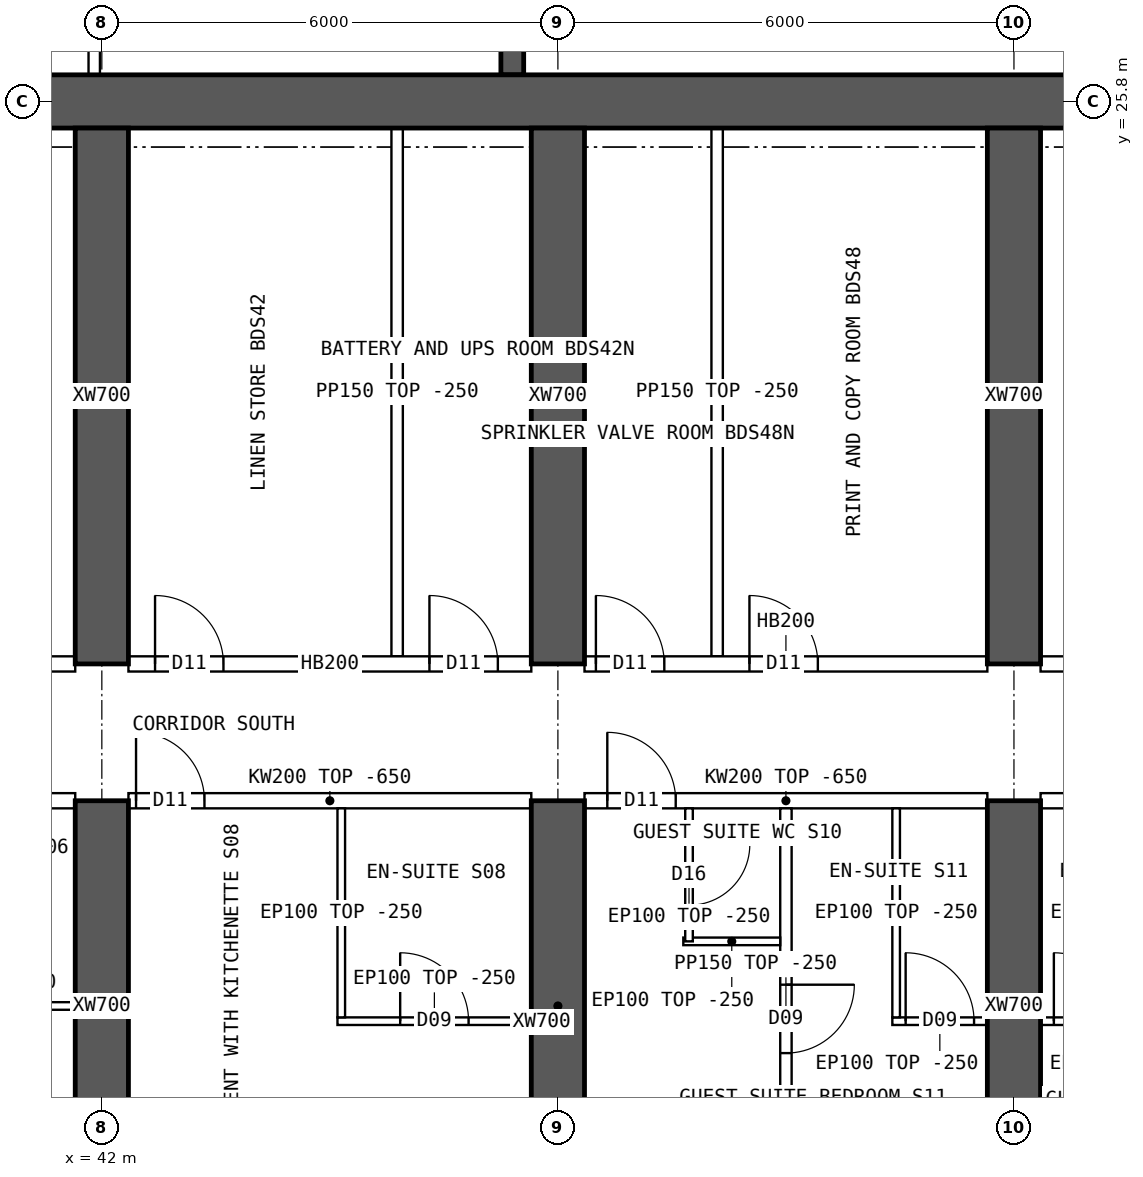
"""IFC4 building model, lengths in metres.
Left out: names, types, materials, properties, quantities, classifications, styles, units other than length and angle.
Written with IfcOpenShell. Run it as: python <this file> out.ifc"""

import sys

from ifc_helpers import new_model, si_unit, direction, frame, frame_2d, origin, place, context, subcontext, project, spatial, polyline, rectangle, outline, extrude, element, fill, save


model = new_model("IFC4")
c1 = context("Model", 3, precision=1e-05, world=origin(), true_north=direction((0.0, 1.0)))
c2 = subcontext(c1, "Body", "Model", "MODEL_VIEW")
j1 = project(units=[si_unit("LENGTHUNIT", "METRE"), si_unit("PLANEANGLEUNIT", "RADIAN")], contexts=[c1])
p1 = place(None, origin())
s1 = spatial("IfcSite", under=j1, at=p1, CompositionType="ELEMENT")
p2 = place(p1, origin())
s2 = spatial("IfcBuilding", under=s1, at=p2, CompositionType="ELEMENT")
p3 = place(p2, frame((0.0, 0.0, 235.3)))
s3 = spatial("IfcBuildingStorey", under=s2, at=p3, CompositionType="ELEMENT", Elevation=235.3)
p4 = place(p3, frame((18.0, 25.8, 0.0), z_axis=(0.0, 0.0, 1.0), x_axis=(1.0, 0.0, 0.0)))
e1 = element("IfcWall", 1, at=p4, inside=s3, PredefinedType="SHEAR", context=c2, shape_type="SweptSolid", body=[
    extrude(rectangle(XDim=48.0, YDim=0.7, at=frame_2d((24.0, 0.0))), origin(), (0.0, 0.0, 1.0), 3.75),
])
p5 = place(p3, frame((47.4, 26.15, 0.0), z_axis=(0.0, 0.0, 1.0), x_axis=(0.0, 1.0, 0.0)))
e2 = element("IfcWall", 2, at=p5, inside=s3, PredefinedType="SHEAR", context=c2, shape_type="SweptSolid", body=[
    extrude(rectangle(XDim=4.1, YDim=0.3, at=frame_2d((2.05, 0.0))), origin(), (0.0, 0.0, 1.0), 3.75),
])
p6 = place(p3, frame((42.0, 11.2, 0.0), z_axis=(0.0, 0.0, 1.0), x_axis=(0.0, 1.0, 0.0)))
e3 = element("IfcWall", 3, at=p6, inside=s3, PredefinedType="SHEAR", context=c2, shape_type="SweptSolid", body=[
    extrude(rectangle(XDim=5.4, YDim=0.7, at=frame_2d((2.7, 0.0))), origin(), (0.0, 0.0, 1.0), 3.75),
])
p7 = place(p3, frame((42.0, 18.4, 0.0), z_axis=(0.0, 0.0, 1.0), x_axis=(0.0, 1.0, 0.0)))
e4 = element("IfcWall", 4, at=p7, inside=s3, PredefinedType="SHEAR", context=c2, shape_type="SweptSolid", body=[
    extrude(rectangle(XDim=7.05, YDim=0.7, at=frame_2d((3.525, 0.0))), origin(), (0.0, 0.0, 1.0), 3.75),
])
p8 = place(p3, frame((48.0, 11.2, 0.0), z_axis=(0.0, 0.0, 1.0), x_axis=(0.0, 1.0, 0.0)))
e5 = element("IfcWall", 5, at=p8, inside=s3, PredefinedType="SHEAR", context=c2, shape_type="SweptSolid", body=[
    extrude(rectangle(XDim=5.4, YDim=0.7, at=frame_2d((2.7, 0.0))), origin(), (0.0, 0.0, 1.0), 3.75),
])
p9 = place(p3, frame((48.0, 18.4, 0.0), z_axis=(0.0, 0.0, 1.0), x_axis=(0.0, 1.0, 0.0)))
e6 = element("IfcWall", 6, at=p9, inside=s3, PredefinedType="SHEAR", context=c2, shape_type="SweptSolid", body=[
    extrude(rectangle(XDim=7.05, YDim=0.7, at=frame_2d((3.525, 0.0))), origin(), (0.0, 0.0, 1.0), 3.75),
])
p10 = place(p3, frame((54.0, 11.2, 0.0), z_axis=(0.0, 0.0, 1.0), x_axis=(0.0, 1.0, 0.0)))
e7 = element("IfcWall", 7, at=p10, inside=s3, PredefinedType="SHEAR", context=c2, shape_type="SweptSolid", body=[
    extrude(rectangle(XDim=5.4, YDim=0.7, at=frame_2d((2.7, 0.0))), origin(), (0.0, 0.0, 1.0), 3.75),
])
p11 = place(p3, frame((54.0, 18.4, 0.0), z_axis=(0.0, 0.0, 1.0), x_axis=(0.0, 1.0, 0.0)))
e8 = element("IfcWall", 8, at=p11, inside=s3, PredefinedType="SHEAR", context=c2, shape_type="SweptSolid", body=[
    extrude(rectangle(XDim=7.05, YDim=0.7, at=frame_2d((3.525, 0.0))), origin(), (0.0, 0.0, 1.0), 3.75),
])
p12 = place(p3, frame((41.9, 26.15, 0.0), z_axis=(0.0, 0.0, 1.0), x_axis=(0.0, 1.0, 0.0)))
e9 = element("IfcWall", 9, at=p12, inside=s3, PredefinedType="SOLIDWALL", context=c2, shape_type="SweptSolid", body=[
    extrude(rectangle(XDim=4.1, YDim=0.15, at=frame_2d((2.05, 0.0))), origin(), (0.0, 0.0, 1.0), 3.5),
])
p13 = place(p3, frame((36.35, 16.6, 0.0), z_axis=(0.0, 0.0, 1.0), x_axis=(1.0, 0.0, 0.0)))
e10 = element("IfcWall", 10, at=p13, inside=s3, PredefinedType="SOLIDWALL", context=c2, shape_type="SweptSolid", body=[
    extrude(outline(polyline([(0.0, 0.0), (5.3, 0.0), (5.3, 3.1), (0.0, 3.1), (0.0, 0.0)])), frame((0.0, 0.1, 0.0), z_axis=(0.0, -1.0, 0.0), x_axis=(1.0, 0.0, 0.0)), (0.0, 0.0, 1.0), 0.2),
])
p14 = place(p13, frame((0.3, 0.0, 0.0)))
e11 = element("IfcOpeningElement", 11, at=p14, cuts=e10, PredefinedType="OPENING", context=c2, shape_type="SweptSolid", body=[
    extrude(rectangle(XDim=1.0, YDim=2.1, at=frame_2d((0.5, 1.05))), frame((0.0, 0.11, 0.0), z_axis=(0.0, -1.0, 0.0), x_axis=(1.0, 0.0, 0.0)), (0.0, 0.0, 1.0), 0.22),
])
p15 = place(p3, frame((36.35, 18.4, 0.0), z_axis=(0.0, 0.0, 1.0), x_axis=(1.0, 0.0, 0.0)))
e12 = element("IfcWall", 12, at=p15, inside=s3, PredefinedType="SOLIDWALL", context=c2, shape_type="SweptSolid", body=[
    extrude(rectangle(XDim=5.3, YDim=0.2, at=frame_2d((2.65, 0.0))), origin(), (0.0, 0.0, 1.0), 3.5),
])
p16 = place(p15, frame((0.15, 0.0, 0.0)))
e13 = element("IfcOpeningElement", 13, at=p16, cuts=e12, PredefinedType="OPENING", context=c2, shape_type="SweptSolid", body=[
    extrude(rectangle(XDim=0.9, YDim=2.1, at=frame_2d((0.45, 1.05))), frame((0.0, 0.11, 0.0), z_axis=(0.0, -1.0, 0.0), x_axis=(1.0, 0.0, 0.0)), (0.0, 0.0, 1.0), 0.22),
])
p17 = place(p15, frame((2.25, 0.0, 0.0)))
e14 = element("IfcOpeningElement", 14, at=p17, cuts=e12, PredefinedType="OPENING", context=c2, shape_type="SweptSolid", body=[
    extrude(rectangle(XDim=0.9, YDim=2.1, at=frame_2d((0.45, 1.05))), frame((0.0, 0.11, 0.0), z_axis=(0.0, -1.0, 0.0), x_axis=(1.0, 0.0, 0.0)), (0.0, 0.0, 1.0), 0.22),
])
p18 = place(p3, frame((42.35, 16.6, 0.0), z_axis=(0.0, 0.0, 1.0), x_axis=(1.0, 0.0, 0.0)))
e15 = element("IfcWall", 15, at=p18, inside=s3, PredefinedType="SOLIDWALL", context=c2, shape_type="SweptSolid", body=[
    extrude(outline(polyline([(0.0, 0.0), (5.3, 0.0), (5.3, 3.1), (0.0, 3.1), (0.0, 0.0)])), frame((0.0, 0.1, 0.0), z_axis=(0.0, -1.0, 0.0), x_axis=(1.0, 0.0, 0.0)), (0.0, 0.0, 1.0), 0.2),
])
p19 = place(p18, frame((0.1, 0.0, 0.0)))
e16 = element("IfcOpeningElement", 16, at=p19, cuts=e15, PredefinedType="OPENING", context=c2, shape_type="SweptSolid", body=[
    extrude(rectangle(XDim=0.9, YDim=2.1, at=frame_2d((0.45, 1.05))), frame((0.0, 0.11, 0.0), z_axis=(0.0, -1.0, 0.0), x_axis=(1.0, 0.0, 0.0)), (0.0, 0.0, 1.0), 0.22),
])
p20 = place(p3, frame((42.35, 18.4, 0.0), z_axis=(0.0, 0.0, 1.0), x_axis=(1.0, 0.0, 0.0)))
e17 = element("IfcWall", 17, at=p20, inside=s3, PredefinedType="SOLIDWALL", context=c2, shape_type="SweptSolid", body=[
    extrude(rectangle(XDim=5.3, YDim=0.2, at=frame_2d((2.65, 0.0))), origin(), (0.0, 0.0, 1.0), 3.5),
])
p21 = place(p20, frame((0.35, 0.0, 0.0)))
e18 = element("IfcOpeningElement", 18, at=p21, cuts=e17, PredefinedType="OPENING", context=c2, shape_type="SweptSolid", body=[
    extrude(rectangle(XDim=0.9, YDim=2.1, at=frame_2d((0.45, 1.05))), frame((0.0, 0.11, 0.0), z_axis=(0.0, -1.0, 0.0), x_axis=(1.0, 0.0, 0.0)), (0.0, 0.0, 1.0), 0.22),
])
p22 = place(p20, frame((3.96, 0.0, 0.0)))
e19 = element("IfcOpeningElement", 19, at=p22, cuts=e17, PredefinedType="OPENING", context=c2, shape_type="SweptSolid", body=[
    extrude(rectangle(XDim=0.9, YDim=2.1, at=frame_2d((0.45, 1.05))), frame((0.0, 0.11, 0.0), z_axis=(0.0, -1.0, 0.0), x_axis=(1.0, 0.0, 0.0)), (0.0, 0.0, 1.0), 0.22),
])
p23 = place(p3, frame((48.35, 16.6, 0.0), z_axis=(0.0, 0.0, 1.0), x_axis=(1.0, 0.0, 0.0)))
e20 = element("IfcWall", 20, at=p23, inside=s3, PredefinedType="SOLIDWALL", context=c2, shape_type="SweptSolid", body=[
    extrude(outline(polyline([(0.0, 0.0), (5.3, 0.0), (5.3, 3.1), (0.0, 3.1), (0.0, 0.0)])), frame((0.0, 0.1, 0.0), z_axis=(0.0, -1.0, 0.0), x_axis=(1.0, 0.0, 0.0)), (0.0, 0.0, 1.0), 0.2),
])
p24 = place(p23, frame((0.3, 0.0, 0.0)))
e21 = element("IfcOpeningElement", 21, at=p24, cuts=e20, PredefinedType="OPENING", context=c2, shape_type="SweptSolid", body=[
    extrude(rectangle(XDim=0.9, YDim=2.1, at=frame_2d((0.45, 1.05))), frame((0.0, 0.11, 0.0), z_axis=(0.0, -1.0, 0.0), x_axis=(1.0, 0.0, 0.0)), (0.0, 0.0, 1.0), 0.22),
])
p25 = place(p3, frame((48.35, 18.4, 0.0), z_axis=(0.0, 0.0, 1.0), x_axis=(1.0, 0.0, 0.0)))
e22 = element("IfcWall", 22, at=p25, inside=s3, PredefinedType="SOLIDWALL", context=c2, shape_type="SweptSolid", body=[
    extrude(rectangle(XDim=5.3, YDim=0.2, at=frame_2d((2.65, 0.0))), origin(), (0.0, 0.0, 1.0), 3.5),
])
p26 = place(p25, frame((0.15, 0.0, 0.0)))
e23 = element("IfcOpeningElement", 23, at=p26, cuts=e22, PredefinedType="OPENING", context=c2, shape_type="SweptSolid", body=[
    extrude(rectangle(XDim=0.9, YDim=2.1, at=frame_2d((0.45, 1.05))), frame((0.0, 0.11, 0.0), z_axis=(0.0, -1.0, 0.0), x_axis=(1.0, 0.0, 0.0)), (0.0, 0.0, 1.0), 0.22),
])
p27 = place(p25, frame((2.17, 0.0, 0.0)))
e24 = element("IfcOpeningElement", 24, at=p27, cuts=e22, PredefinedType="OPENING", context=c2, shape_type="SweptSolid", body=[
    extrude(rectangle(XDim=0.9, YDim=2.1, at=frame_2d((0.45, 1.05))), frame((0.0, 0.11, 0.0), z_axis=(0.0, -1.0, 0.0), x_axis=(1.0, 0.0, 0.0)), (0.0, 0.0, 1.0), 0.22),
])
p28 = place(p3, frame((54.35, 16.6, 0.0), z_axis=(0.0, 0.0, 1.0), x_axis=(1.0, 0.0, 0.0)))
e25 = element("IfcWall", 25, at=p28, inside=s3, PredefinedType="SOLIDWALL", context=c2, shape_type="SweptSolid", body=[
    extrude(outline(polyline([(0.0, 0.0), (5.3, 0.0), (5.3, 3.1), (0.0, 3.1), (0.0, 0.0)])), frame((0.0, 0.1, 0.0), z_axis=(0.0, -1.0, 0.0), x_axis=(1.0, 0.0, 0.0)), (0.0, 0.0, 1.0), 0.2),
])
p29 = place(p28, frame((1.3, 0.0, 0.0)))
e26 = element("IfcOpeningElement", 26, at=p29, cuts=e25, PredefinedType="OPENING", context=c2, shape_type="SweptSolid", body=[
    extrude(rectangle(XDim=0.9, YDim=2.1, at=frame_2d((0.45, 1.05))), frame((0.0, 0.11, 0.0), z_axis=(0.0, -1.0, 0.0), x_axis=(1.0, 0.0, 0.0)), (0.0, 0.0, 1.0), 0.22),
])
p30 = place(p28, frame((2.825, 0.0, 0.0)))
e27 = element("IfcOpeningElement", 27, at=p30, cuts=e25, PredefinedType="OPENING", context=c2, shape_type="SweptSolid", body=[
    extrude(rectangle(XDim=0.9, YDim=2.1, at=frame_2d((0.45, 1.05))), frame((0.0, 0.11, 0.0), z_axis=(0.0, -1.0, 0.0), x_axis=(1.0, 0.0, 0.0)), (0.0, 0.0, 1.0), 0.22),
])
p31 = place(p3, frame((54.35, 18.4, 0.0), z_axis=(0.0, 0.0, 1.0), x_axis=(1.0, 0.0, 0.0)))
e28 = element("IfcWall", 28, at=p31, inside=s3, PredefinedType="SOLIDWALL", context=c2, shape_type="SweptSolid", body=[
    extrude(rectangle(XDim=5.3, YDim=0.2, at=frame_2d((2.65, 0.0))), origin(), (0.0, 0.0, 1.0), 3.5),
])
p32 = place(p31, frame((0.8, 0.0, 0.0)))
e29 = element("IfcOpeningElement", 29, at=p32, cuts=e28, PredefinedType="OPENING", context=c2, shape_type="SweptSolid", body=[
    extrude(rectangle(XDim=1.0, YDim=2.1, at=frame_2d((0.5, 1.05))), frame((0.0, 0.11, 0.0), z_axis=(0.0, -1.0, 0.0), x_axis=(1.0, 0.0, 0.0)), (0.0, 0.0, 1.0), 0.22),
])
p33 = place(p3, frame((39.0, 13.9, 0.0), z_axis=(0.0, 0.0, 1.0), x_axis=(1.0, 0.0, 0.0)))
e30 = element("IfcWall", 30, at=p33, inside=s3, PredefinedType="PARTITIONING", context=c2, shape_type="SweptSolid", body=[
    extrude(rectangle(XDim=2.65, YDim=0.1, at=frame_2d((1.325, 0.0))), origin(), (0.0, 0.0, 1.0), 3.5),
])
p34 = place(p3, frame((47.65, 13.7, 0.0), z_axis=(0.0, 0.0, 1.0), x_axis=(-1.0, 0.0, 0.0)))
e31 = element("IfcWall", 31, at=p34, inside=s3, PredefinedType="PARTITIONING", context=c2, shape_type="SweptSolid", body=[
    extrude(rectangle(XDim=2.55, YDim=0.1, at=frame_2d((1.275, 0.0))), origin(), (0.0, 0.0, 1.0), 3.5),
])
p35 = place(p34, frame((0.825, 0.0, 0.0)))
e32 = element("IfcOpeningElement", 32, at=p35, cuts=e31, PredefinedType="OPENING", context=c2, shape_type="SweptSolid", body=[
    extrude(rectangle(XDim=0.9, YDim=2.1, at=frame_2d((0.45, 1.05))), frame((0.0, 0.06, 0.0), z_axis=(0.0, -1.0, 0.0), x_axis=(1.0, 0.0, 0.0)), (0.0, 0.0, 1.0), 0.12),
])
p36 = place(p3, frame((45.15, 13.75, 0.0), z_axis=(0.0, 0.0, 1.0), x_axis=(0.0, 1.0, 0.0)))
e33 = element("IfcWall", 33, at=p36, inside=s3, PredefinedType="PARTITIONING", context=c2, shape_type="SweptSolid", body=[
    extrude(outline(polyline([(0.0, 0.0), (2.75, 0.0), (2.75, 3.1), (2.702, 3.1), (2.7, 3.5), (0.0, 3.5), (0.0, 0.0)])), frame((0.0, 0.05, 0.0), z_axis=(0.0, -1.0, 0.0), x_axis=(1.0, 0.0, 0.0)), (0.0, 0.0, 1.0), 0.1),
])
p37 = place(p3, frame((51.0, 11.01, 0.0), z_axis=(0.0, 0.0, 1.0), x_axis=(0.0, 1.0, 0.0)))
e34 = element("IfcWall", 34, at=p37, inside=s3, PredefinedType="PARTITIONING", context=c2, shape_type="SweptSolid", body=[
    extrude(outline(polyline([(0.0, 0.0), (5.49, 0.0), (5.49, 3.1), (5.442, 3.1), (5.44, 3.5), (0.792, 3.5), (0.79, 3.1), (0.392, 3.1), (0.39, 3.5), (0.0, 3.5), (0.0, 0.0)])), frame((0.0, 0.075, 0.0), z_axis=(0.0, -1.0, 0.0), x_axis=(1.0, 0.0, 0.0)), (0.0, 0.0, 1.0), 0.15),
])
p38 = place(p37, frame((2.27, 0.0, 0.0)))
e35 = element("IfcOpeningElement", 35, at=p38, cuts=e34, PredefinedType="OPENING", context=c2, shape_type="SweptSolid", body=[
    extrude(rectangle(XDim=0.9, YDim=2.1, at=frame_2d((0.45, 1.05))), frame((0.0, 0.085, 0.0), z_axis=(0.0, -1.0, 0.0), x_axis=(1.0, 0.0, 0.0)), (0.0, 0.0, 1.0), 0.17),
])
p39 = place(p3, frame((53.65, 13.7, 0.0), z_axis=(0.0, 0.0, 1.0), x_axis=(-1.0, 0.0, 0.0)))
e36 = element("IfcWall", 36, at=p39, inside=s3, PredefinedType="PARTITIONING", context=c2, shape_type="SweptSolid", body=[
    extrude(rectangle(XDim=1.25, YDim=0.1, at=frame_2d((0.625, 0.0))), origin(), (0.0, 0.0, 1.0), 3.5),
])
p40 = place(p39, frame((0.175, 0.0, 0.0)))
e37 = element("IfcOpeningElement", 37, at=p40, cuts=e36, PredefinedType="OPENING", context=c2, shape_type="SweptSolid", body=[
    extrude(rectangle(XDim=0.9, YDim=2.1, at=frame_2d((0.45, 1.05))), frame((0.0, 0.06, 0.0), z_axis=(0.0, -1.0, 0.0), x_axis=(1.0, 0.0, 0.0)), (0.0, 0.0, 1.0), 0.12),
])
p41 = place(p3, frame((52.45, 13.75, 0.0), z_axis=(0.0, 0.0, 1.0), x_axis=(0.0, 1.0, 0.0)))
e38 = element("IfcWall", 38, at=p41, inside=s3, PredefinedType="PARTITIONING", context=c2, shape_type="SweptSolid", body=[
    extrude(outline(polyline([(0.0, 0.0), (2.75, 0.0), (2.75, 3.1), (2.702, 3.1), (2.7, 3.5), (0.0, 3.5), (0.0, 0.0)])), frame((0.0, 0.05, 0.0), z_axis=(0.0, -1.0, 0.0), x_axis=(1.0, 0.0, 0.0)), (0.0, 0.0, 1.0), 0.1),
])
p42 = place(p3, frame((49.65, 14.75, 0.0), z_axis=(0.0, 0.0, 1.0), x_axis=(1.0, 0.0, 0.0)))
e39 = element("IfcWall", 39, at=p42, inside=s3, PredefinedType="PARTITIONING", context=c2, shape_type="SweptSolid", body=[
    extrude(rectangle(XDim=1.275, YDim=0.1, at=frame_2d((0.638, 0.0))), origin(), (0.0, 0.0, 1.0), 3.5),
])
p43 = place(p3, frame((49.725, 14.75, 0.0), z_axis=(0.0, 0.0, 1.0), x_axis=(0.0, 1.0, 0.0)))
e40 = element("IfcWall", 40, at=p43, inside=s3, PredefinedType="PARTITIONING", context=c2, shape_type="SweptSolid", body=[
    extrude(outline(polyline([(0.0, 0.0), (1.75, 0.0), (1.75, 3.1), (1.702, 3.1), (1.7, 3.5), (0.0, 3.5), (0.0, 0.0)])), frame((0.0, 0.05, 0.0), z_axis=(0.0, -1.0, 0.0), x_axis=(1.0, 0.0, 0.0)), (0.0, 0.0, 1.0), 0.1),
])
p44 = place(p43, frame((0.475, 0.0, 0.0)))
e41 = element("IfcOpeningElement", 41, at=p44, cuts=e40, PredefinedType="OPENING", context=c2, shape_type="SweptSolid", body=[
    extrude(rectangle(XDim=0.8, YDim=2.1, at=frame_2d((0.4, 1.05))), frame((0.0, 0.06, 0.0), z_axis=(0.0, -1.0, 0.0), x_axis=(1.0, 0.0, 0.0)), (0.0, 0.0, 1.0), 0.12),
])
p45 = place(p3, frame((55.6, 13.7, 0.0), z_axis=(0.0, 0.0, 1.0), x_axis=(-1.0, 0.0, 0.0)))
e42 = element("IfcWall", 42, at=p45, inside=s3, PredefinedType="PARTITIONING", context=c2, shape_type="SweptSolid", body=[
    extrude(rectangle(XDim=1.25, YDim=0.1, at=frame_2d((0.625, 0.0))), origin(), (0.0, 0.0, 1.0), 3.5),
])
p46 = place(p45, frame((0.175, 0.0, 0.0)))
e43 = element("IfcOpeningElement", 43, at=p46, cuts=e42, PredefinedType="OPENING", context=c2, shape_type="SweptSolid", body=[
    extrude(rectangle(XDim=0.9, YDim=2.1, at=frame_2d((0.45, 1.05))), frame((0.0, 0.06, 0.0), z_axis=(0.0, -1.0, 0.0), x_axis=(1.0, 0.0, 0.0)), (0.0, 0.0, 1.0), 0.12),
])
for number, where, z_axis, x_axis in (
    (44, (45.885, 18.5, 0.0), (0.0, 0.0, 1.0), (0.0, 1.0, 0.0)),
    (45, (50.095, 18.5, 0.0), (0.0, 0.0, 1.0), (0.0, 1.0, 0.0)),
):
    element("IfcWall", number, at=place(p3, frame(where, z_axis=z_axis, x_axis=x_axis)), inside=s3, PredefinedType="PARTITIONING", context=c2, shape_type="SweptSolid", body=[
        extrude(rectangle(XDim=6.95, YDim=0.15, at=frame_2d((3.475, 0.0))), origin(), (0.0, 0.0, 1.0), 3.5),
    ])
p47 = place(p35, origin())
e46 = element("IfcDoor", 46, at=p47, inside=s3, OperationType="SINGLE_SWING_RIGHT", PredefinedType="DOOR", context=c2, shape_type="SweptSolid", body=[
    extrude(rectangle(XDim=0.9, YDim=2.1, at=frame_2d((0.45, 1.05))), frame((0.0, 0.025, 0.0), z_axis=(0.0, -1.0, 0.0), x_axis=(1.0, 0.0, 0.0)), (0.0, 0.0, 1.0), 0.05),
])
fill(e32, e46)
p48 = place(p19, origin())
e47 = element("IfcDoor", 47, at=p48, inside=s3, OperationType="SINGLE_SWING_LEFT", PredefinedType="DOOR", context=c2, shape_type="SweptSolid", body=[
    extrude(rectangle(XDim=0.9, YDim=2.1, at=frame_2d((0.45, 1.05))), frame((0.0, 0.025, 0.0), z_axis=(0.0, -1.0, 0.0), x_axis=(1.0, 0.0, 0.0)), (0.0, 0.0, 1.0), 0.05),
])
fill(e16, e47)
p49 = place(p24, origin())
e48 = element("IfcDoor", 48, at=p49, inside=s3, OperationType="SINGLE_SWING_LEFT", PredefinedType="DOOR", context=c2, shape_type="SweptSolid", body=[
    extrude(rectangle(XDim=0.9, YDim=2.1, at=frame_2d((0.45, 1.05))), frame((0.0, 0.025, 0.0), z_axis=(0.0, -1.0, 0.0), x_axis=(1.0, 0.0, 0.0)), (0.0, 0.0, 1.0), 0.05),
])
fill(e21, e48)
p50 = place(p40, origin())
e49 = element("IfcDoor", 49, at=p50, inside=s3, OperationType="SINGLE_SWING_RIGHT", PredefinedType="DOOR", context=c2, shape_type="SweptSolid", body=[
    extrude(rectangle(XDim=0.9, YDim=2.1, at=frame_2d((0.45, 1.05))), frame((0.0, 0.025, 0.0), z_axis=(0.0, -1.0, 0.0), x_axis=(1.0, 0.0, 0.0)), (0.0, 0.0, 1.0), 0.05),
])
fill(e37, e49)
p51 = place(p38, origin())
e50 = element("IfcDoor", 50, at=p51, inside=s3, OperationType="SINGLE_SWING_RIGHT", PredefinedType="DOOR", context=c2, shape_type="SweptSolid", body=[
    extrude(rectangle(XDim=0.9, YDim=2.1, at=frame_2d((0.45, 1.05))), frame((0.0, 0.025, 0.0), z_axis=(0.0, -1.0, 0.0), x_axis=(1.0, 0.0, 0.0)), (0.0, 0.0, 1.0), 0.05),
])
fill(e35, e50)
p52 = place(p44, origin())
e51 = element("IfcDoor", 51, at=p52, inside=s3, OperationType="SINGLE_SWING_RIGHT", PredefinedType="DOOR", context=c2, shape_type="SweptSolid", body=[
    extrude(rectangle(XDim=0.8, YDim=2.1, at=frame_2d((0.4, 1.05))), frame((0.0, 0.025, 0.0), z_axis=(0.0, -1.0, 0.0), x_axis=(1.0, 0.0, 0.0)), (0.0, 0.0, 1.0), 0.05),
])
fill(e41, e51)
p53 = place(p46, origin())
e52 = element("IfcDoor", 52, at=p53, inside=s3, OperationType="SINGLE_SWING_RIGHT", PredefinedType="DOOR", context=c2, shape_type="SweptSolid", body=[
    extrude(rectangle(XDim=0.9, YDim=2.1, at=frame_2d((0.45, 1.05))), frame((0.0, 0.025, 0.0), z_axis=(0.0, -1.0, 0.0), x_axis=(1.0, 0.0, 0.0)), (0.0, 0.0, 1.0), 0.05),
])
fill(e43, e52)
p54 = place(p21, origin())
e53 = element("IfcDoor", 53, at=p54, inside=s3, OperationType="SINGLE_SWING_LEFT", PredefinedType="DOOR", context=c2, shape_type="SweptSolid", body=[
    extrude(rectangle(XDim=0.9, YDim=2.1, at=frame_2d((0.45, 1.05))), frame((0.0, 0.025, 0.0), z_axis=(0.0, -1.0, 0.0), x_axis=(1.0, 0.0, 0.0)), (0.0, 0.0, 1.0), 0.05),
])
fill(e18, e53)
p55 = place(p22, origin())
e54 = element("IfcDoor", 54, at=p55, inside=s3, OperationType="SINGLE_SWING_LEFT", PredefinedType="DOOR", context=c2, shape_type="SweptSolid", body=[
    extrude(rectangle(XDim=0.9, YDim=2.1, at=frame_2d((0.45, 1.05))), frame((0.0, 0.025, 0.0), z_axis=(0.0, -1.0, 0.0), x_axis=(1.0, 0.0, 0.0)), (0.0, 0.0, 1.0), 0.05),
])
fill(e19, e54)
p56 = place(p26, origin())
e55 = element("IfcDoor", 55, at=p56, inside=s3, OperationType="SINGLE_SWING_LEFT", PredefinedType="DOOR", context=c2, shape_type="SweptSolid", body=[
    extrude(rectangle(XDim=0.9, YDim=2.1, at=frame_2d((0.45, 1.05))), frame((0.0, 0.025, 0.0), z_axis=(0.0, -1.0, 0.0), x_axis=(1.0, 0.0, 0.0)), (0.0, 0.0, 1.0), 0.05),
])
fill(e23, e55)
p57 = place(p27, origin())
e56 = element("IfcDoor", 56, at=p57, inside=s3, OperationType="SINGLE_SWING_LEFT", PredefinedType="DOOR", context=c2, shape_type="SweptSolid", body=[
    extrude(rectangle(XDim=0.9, YDim=2.1, at=frame_2d((0.45, 1.05))), frame((0.0, 0.025, 0.0), z_axis=(0.0, -1.0, 0.0), x_axis=(1.0, 0.0, 0.0)), (0.0, 0.0, 1.0), 0.05),
])
fill(e24, e56)
save(model, sys.argv[1])
